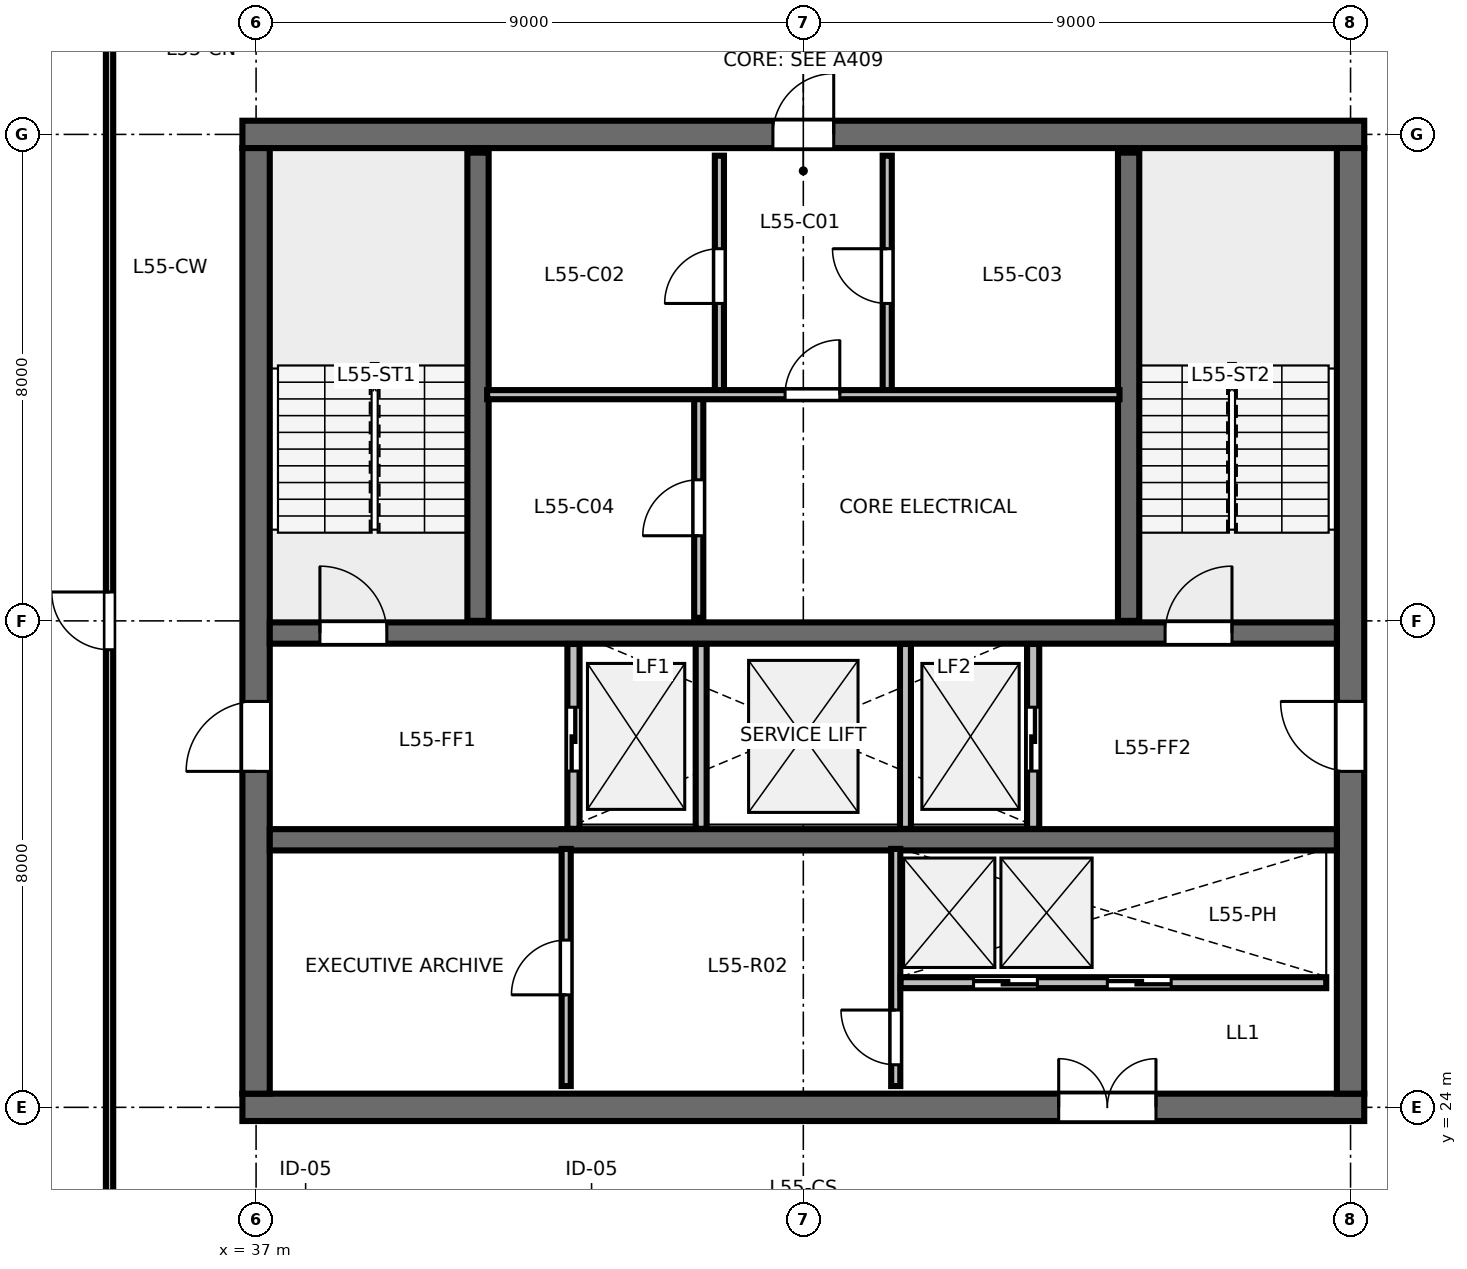
"""IFC4 building model, lengths in metres.
Left out: names, types, materials, properties, quantities, classifications, styles, units other than length and angle.
Written with IfcOpenShell. Run it as: python <this file> out.ifc"""

import sys

from ifc_helpers import new_model, si_unit, direction, frame, frame_2d, origin, place, context, subcontext, project, spatial, rectangle, extrude, element, fill, save


model = new_model("IFC4")
c1 = context("Model", 3, precision=1e-05, world=origin(), true_north=direction((0.0, 1.0)))
c2 = subcontext(c1, "Body", "Model", "MODEL_VIEW")
j1 = project(units=[si_unit("LENGTHUNIT", "METRE"), si_unit("PLANEANGLEUNIT", "RADIAN")], contexts=[c1])
p1 = place(None, origin())
s1 = spatial("IfcSite", under=j1, at=p1, CompositionType="ELEMENT")
p2 = place(p1, origin())
s2 = spatial("IfcBuilding", under=s1, at=p2, CompositionType="ELEMENT")
p3 = place(p2, frame((0.0, 0.0, 209.4)))
s3 = spatial("IfcBuildingStorey", under=s2, at=p3, CompositionType="ELEMENT", Elevation=209.4)
p4 = place(p3, frame((36.775, 24.0, 0.0), z_axis=(0.0, 0.0, 1.0), x_axis=(1.0, 0.0, 0.0)))
e1 = element("IfcWall", 1, at=p4, inside=s3, PredefinedType="SHEAR", context=c2, shape_type="SweptSolid", body=[
    extrude(rectangle(XDim=18.45, YDim=0.45, at=frame_2d((9.225, 0.0))), origin(), (0.0, 0.0, 1.0), 3.36),
])
p5 = place(p4, frame((13.425, 0.0, 0.0)))
e2 = element("IfcOpeningElement", 2, at=p5, cuts=e1, PredefinedType="OPENING", context=c2, shape_type="SweptSolid", body=[
    extrude(rectangle(XDim=1.6, YDim=2.15, at=frame_2d((0.8, 1.075))), frame((0.0, 0.235, 0.0), z_axis=(0.0, -1.0, 0.0), x_axis=(1.0, 0.0, 0.0)), (0.0, 0.0, 1.0), 0.47),
])
p6 = place(p3, frame((36.775, 40.0, 0.0), z_axis=(0.0, 0.0, 1.0), x_axis=(1.0, 0.0, 0.0)))
e3 = element("IfcWall", 3, at=p6, inside=s3, PredefinedType="SHEAR", context=c2, shape_type="SweptSolid", body=[
    extrude(rectangle(XDim=18.45, YDim=0.45, at=frame_2d((9.225, 0.0))), origin(), (0.0, 0.0, 1.0), 3.36),
])
p7 = place(p6, frame((8.725, 0.0, 0.0)))
e4 = element("IfcOpeningElement", 4, at=p7, cuts=e3, PredefinedType="OPENING", context=c2, shape_type="SweptSolid", body=[
    extrude(rectangle(XDim=1.0, YDim=2.15, at=frame_2d((0.5, 1.075))), frame((0.0, 0.235, 0.0), z_axis=(0.0, -1.0, 0.0), x_axis=(1.0, 0.0, 0.0)), (0.0, 0.0, 1.0), 0.47),
])
p8 = place(p3, frame((37.0, 24.225, 0.0), z_axis=(0.0, 0.0, 1.0), x_axis=(0.0, 1.0, 0.0)))
e5 = element("IfcWall", 5, at=p8, inside=s3, PredefinedType="SHEAR", context=c2, shape_type="SweptSolid", body=[
    extrude(rectangle(XDim=15.55, YDim=0.45, at=frame_2d((7.775, 0.0))), origin(), (0.0, 0.0, 1.0), 3.36),
])
p9 = place(p8, frame((5.3, 0.0, 0.0)))
e6 = element("IfcOpeningElement", 6, at=p9, cuts=e5, PredefinedType="OPENING", context=c2, shape_type="SweptSolid", body=[
    extrude(rectangle(XDim=1.15, YDim=2.15, at=frame_2d((0.575, 1.075))), frame((0.0, 0.235, 0.0), z_axis=(0.0, -1.0, 0.0), x_axis=(1.0, 0.0, 0.0)), (0.0, 0.0, 1.0), 0.47),
])
p10 = place(p3, frame((55.0, 24.225, 0.0), z_axis=(0.0, 0.0, 1.0), x_axis=(0.0, 1.0, 0.0)))
e7 = element("IfcWall", 7, at=p10, inside=s3, PredefinedType="SHEAR", context=c2, shape_type="SweptSolid", body=[
    extrude(rectangle(XDim=15.55, YDim=0.45, at=frame_2d((7.775, 0.0))), origin(), (0.0, 0.0, 1.0), 3.36),
])
p11 = place(p10, frame((5.3, 0.0, 0.0)))
e8 = element("IfcOpeningElement", 8, at=p11, cuts=e7, PredefinedType="OPENING", context=c2, shape_type="SweptSolid", body=[
    extrude(rectangle(XDim=1.15, YDim=2.15, at=frame_2d((0.575, 1.075))), frame((0.0, 0.235, 0.0), z_axis=(0.0, -1.0, 0.0), x_axis=(1.0, 0.0, 0.0)), (0.0, 0.0, 1.0), 0.47),
])
p12 = place(p3, frame((37.225, 31.8, 0.0), z_axis=(0.0, 0.0, 1.0), x_axis=(1.0, 0.0, 0.0)))
e9 = element("IfcWall", 9, at=p12, inside=s3, PredefinedType="SHEAR", context=c2, shape_type="SweptSolid", body=[
    extrude(rectangle(XDim=17.55, YDim=0.35, at=frame_2d((8.775, 0.0))), origin(), (0.0, 0.0, 1.0), 3.36),
])
p13 = place(p12, frame((0.825, 0.0, 0.0)))
e10 = element("IfcOpeningElement", 10, at=p13, cuts=e9, PredefinedType="OPENING", context=c2, shape_type="SweptSolid", body=[
    extrude(rectangle(XDim=1.1, YDim=2.15, at=frame_2d((0.55, 1.075))), frame((0.0, 0.185, 0.0), z_axis=(0.0, -1.0, 0.0), x_axis=(1.0, 0.0, 0.0)), (0.0, 0.0, 1.0), 0.37),
])
p14 = place(p12, frame((14.725, 0.0, 0.0)))
e11 = element("IfcOpeningElement", 11, at=p14, cuts=e9, PredefinedType="OPENING", context=c2, shape_type="SweptSolid", body=[
    extrude(rectangle(XDim=1.1, YDim=2.15, at=frame_2d((0.55, 1.075))), frame((0.0, 0.185, 0.0), z_axis=(0.0, -1.0, 0.0), x_axis=(1.0, 0.0, 0.0)), (0.0, 0.0, 1.0), 0.37),
])
p15 = place(p3, frame((37.225, 28.4, 0.0), z_axis=(0.0, 0.0, 1.0), x_axis=(1.0, 0.0, 0.0)))
e12 = element("IfcWall", 12, at=p15, inside=s3, PredefinedType="SHEAR", context=c2, shape_type="SweptSolid", body=[
    extrude(rectangle(XDim=17.55, YDim=0.35, at=frame_2d((8.775, 0.0))), origin(), (0.0, 0.0, 1.0), 3.36),
])
for number, where, z_axis, x_axis in (
    (13, (40.65, 32.0, 0.0), (0.0, 0.0, 1.0), (0.0, 1.0, 0.0)),
    (14, (51.35, 32.0, 0.0), (0.0, 0.0, 1.0), (0.0, 1.0, 0.0)),
):
    element("IfcWall", number, at=place(p3, frame(where, z_axis=z_axis, x_axis=x_axis)), inside=s3, PredefinedType="SHEAR", context=c2, shape_type="SweptSolid", body=[
        extrude(rectangle(XDim=7.7, YDim=0.35, at=frame_2d((3.85, 0.0))), origin(), (0.0, 0.0, 1.0), 3.6),
    ])
p16 = place(p3, frame((44.62, 35.72, 0.0), z_axis=(0.0, 0.0, 1.0), x_axis=(0.0, 1.0, 0.0)))
e15 = element("IfcWall", 15, at=p16, inside=s3, PredefinedType="PARTITIONING", context=c2, shape_type="SweptSolid", body=[
    extrude(rectangle(XDim=3.93, YDim=0.15, at=frame_2d((1.965, 0.0))), origin(), (0.0, 0.0, 1.0), 3.375),
])
p17 = place(p16, frame((1.5, 0.0, 0.0)))
e16 = element("IfcOpeningElement", 16, at=p17, cuts=e15, PredefinedType="OPENING", context=c2, shape_type="SweptSolid", body=[
    extrude(rectangle(XDim=0.9, YDim=2.15, at=frame_2d((0.45, 1.075))), frame((0.0, 0.085, 0.0), z_axis=(0.0, -1.0, 0.0), x_axis=(1.0, 0.0, 0.0)), (0.0, 0.0, 1.0), 0.17),
])
p18 = place(p3, frame((47.38, 35.72, 0.0), z_axis=(0.0, 0.0, 1.0), x_axis=(0.0, 1.0, 0.0)))
e17 = element("IfcWall", 17, at=p18, inside=s3, PredefinedType="PARTITIONING", context=c2, shape_type="SweptSolid", body=[
    extrude(rectangle(XDim=3.93, YDim=0.15, at=frame_2d((1.965, 0.0))), origin(), (0.0, 0.0, 1.0), 3.375),
])
p19 = place(p18, frame((1.5, 0.0, 0.0)))
e18 = element("IfcOpeningElement", 18, at=p19, cuts=e17, PredefinedType="OPENING", context=c2, shape_type="SweptSolid", body=[
    extrude(rectangle(XDim=0.9, YDim=2.15, at=frame_2d((0.45, 1.075))), frame((0.0, 0.085, 0.0), z_axis=(0.0, -1.0, 0.0), x_axis=(1.0, 0.0, 0.0)), (0.0, 0.0, 1.0), 0.17),
])
p20 = place(p3, frame((44.28, 32.05, 0.0), z_axis=(0.0, 0.0, 1.0), x_axis=(0.0, 1.0, 0.0)))
e19 = element("IfcWall", 19, at=p20, inside=s3, PredefinedType="PARTITIONING", context=c2, shape_type="SweptSolid", body=[
    extrude(rectangle(XDim=3.67, YDim=0.15, at=frame_2d((1.835, 0.0))), origin(), (0.0, 0.0, 1.0), 3.375),
])
p21 = place(p20, frame((1.35, 0.0, 0.0)))
e20 = element("IfcOpeningElement", 20, at=p21, cuts=e19, PredefinedType="OPENING", context=c2, shape_type="SweptSolid", body=[
    extrude(rectangle(XDim=0.92, YDim=2.15, at=frame_2d((0.46, 1.075))), frame((0.0, 0.085, 0.0), z_axis=(0.0, -1.0, 0.0), x_axis=(1.0, 0.0, 0.0)), (0.0, 0.0, 1.0), 0.17),
])
p22 = place(p3, frame((40.8, 35.72, 0.0), z_axis=(0.0, 0.0, 1.0), x_axis=(1.0, 0.0, 0.0)))
e21 = element("IfcWall", 21, at=p22, inside=s3, PredefinedType="PARTITIONING", context=c2, shape_type="SweptSolid", body=[
    extrude(rectangle(XDim=10.4, YDim=0.15, at=frame_2d((5.2, 0.0))), origin(), (0.0, 0.0, 1.0), 3.375),
])
p23 = place(p22, frame((4.9, 0.0, 0.0)))
e22 = element("IfcOpeningElement", 22, at=p23, cuts=e21, PredefinedType="OPENING", context=c2, shape_type="SweptSolid", body=[
    extrude(rectangle(XDim=0.9, YDim=2.15, at=frame_2d((0.45, 1.075))), frame((0.0, 0.085, 0.0), z_axis=(0.0, -1.0, 0.0), x_axis=(1.0, 0.0, 0.0)), (0.0, 0.0, 1.0), 0.17),
])
p24 = place(p3, frame((42.22, 28.58, 0.0), z_axis=(0.0, 0.0, 1.0), x_axis=(0.0, 1.0, 0.0)))
e23 = element("IfcWall", 23, at=p24, inside=s3, PredefinedType="PARTITIONING", context=c2, shape_type="SweptSolid", body=[
    extrude(rectangle(XDim=3.04, YDim=0.2, at=frame_2d((1.52, 0.0))), origin(), (0.0, 0.0, 1.0), 3.375),
])
p25 = place(p24, frame((0.95, 0.0, 0.0)))
e24 = element("IfcOpeningElement", 24, at=p25, cuts=e23, PredefinedType="OPENING", context=c2, shape_type="SweptSolid", body=[
    extrude(rectangle(XDim=1.05, YDim=2.15, at=frame_2d((0.525, 1.075))), frame((0.0, 0.11, 0.0), z_axis=(0.0, -1.0, 0.0), x_axis=(1.0, 0.0, 0.0)), (0.0, 0.0, 1.0), 0.22),
])
p26 = place(p3, frame((49.78, 28.58, 0.0), z_axis=(0.0, 0.0, 1.0), x_axis=(0.0, 1.0, 0.0)))
e25 = element("IfcWall", 25, at=p26, inside=s3, PredefinedType="PARTITIONING", context=c2, shape_type="SweptSolid", body=[
    extrude(rectangle(XDim=3.04, YDim=0.2, at=frame_2d((1.52, 0.0))), origin(), (0.0, 0.0, 1.0), 3.375),
])
p27 = place(p26, frame((0.95, 0.0, 0.0)))
e26 = element("IfcOpeningElement", 26, at=p27, cuts=e25, PredefinedType="OPENING", context=c2, shape_type="SweptSolid", body=[
    extrude(rectangle(XDim=1.05, YDim=2.15, at=frame_2d((0.525, 1.075))), frame((0.0, 0.11, 0.0), z_axis=(0.0, -1.0, 0.0), x_axis=(1.0, 0.0, 0.0)), (0.0, 0.0, 1.0), 0.22),
])
for number, where, z_axis, x_axis in (
    (27, (44.32, 28.58, 0.0), (0.0, 0.0, 1.0), (0.0, 1.0, 0.0)),
    (28, (47.68, 28.58, 0.0), (0.0, 0.0, 1.0), (0.0, 1.0, 0.0)),
):
    element("IfcWall", number, at=place(p3, frame(where, z_axis=z_axis, x_axis=x_axis)), inside=s3, PredefinedType="PARTITIONING", context=c2, shape_type="SweptSolid", body=[
        extrude(rectangle(XDim=3.04, YDim=0.18, at=frame_2d((1.52, 0.0))), origin(), (0.0, 0.0, 1.0), 3.375),
    ])
p28 = place(p3, frame((42.1, 24.35, 0.0), z_axis=(0.0, 0.0, 1.0), x_axis=(0.0, 1.0, 0.0)))
e29 = element("IfcWall", 29, at=p28, inside=s3, PredefinedType="PARTITIONING", context=c2, shape_type="SweptSolid", body=[
    extrude(rectangle(XDim=3.9, YDim=0.15, at=frame_2d((1.95, 0.0))), origin(), (0.0, 0.0, 1.0), 3.375),
])
p29 = place(p28, frame((1.5, 0.0, 0.0)))
e30 = element("IfcOpeningElement", 30, at=p29, cuts=e29, PredefinedType="OPENING", context=c2, shape_type="SweptSolid", body=[
    extrude(rectangle(XDim=0.9, YDim=2.15, at=frame_2d((0.45, 1.075))), frame((0.0, 0.085, 0.0), z_axis=(0.0, -1.0, 0.0), x_axis=(1.0, 0.0, 0.0)), (0.0, 0.0, 1.0), 0.17),
])
p30 = place(p3, frame((47.52, 24.35, 0.0), z_axis=(0.0, 0.0, 1.0), x_axis=(0.0, 1.0, 0.0)))
e31 = element("IfcWall", 31, at=p30, inside=s3, PredefinedType="PARTITIONING", context=c2, shape_type="SweptSolid", body=[
    extrude(rectangle(XDim=3.9, YDim=0.15, at=frame_2d((1.95, 0.0))), origin(), (0.0, 0.0, 1.0), 3.375),
])
p31 = place(p30, frame((0.35, 0.0, 0.0)))
e32 = element("IfcOpeningElement", 32, at=p31, cuts=e31, PredefinedType="OPENING", context=c2, shape_type="SweptSolid", body=[
    extrude(rectangle(XDim=0.9, YDim=2.15, at=frame_2d((0.45, 1.075))), frame((0.0, 0.085, 0.0), z_axis=(0.0, -1.0, 0.0), x_axis=(1.0, 0.0, 0.0)), (0.0, 0.0, 1.0), 0.17),
])
p32 = place(p3, frame((47.6, 26.05, 0.0), z_axis=(0.0, 0.0, 1.0), x_axis=(1.0, 0.0, 0.0)))
e33 = element("IfcWall", 33, at=p32, inside=s3, PredefinedType="PARTITIONING", context=c2, shape_type="SweptSolid", body=[
    extrude(rectangle(XDim=7.0, YDim=0.18, at=frame_2d((3.5, 0.0))), origin(), (0.0, 0.0, 1.0), 3.375),
])
p33 = place(p32, frame((1.2, 0.0, 0.0)))
e34 = element("IfcOpeningElement", 34, at=p33, cuts=e33, PredefinedType="OPENING", context=c2, shape_type="SweptSolid", body=[
    extrude(rectangle(XDim=1.05, YDim=2.15, at=frame_2d((0.525, 1.075))), frame((0.0, 0.1, 0.0), z_axis=(0.0, -1.0, 0.0), x_axis=(1.0, 0.0, 0.0)), (0.0, 0.0, 1.0), 0.2),
])
p34 = place(p32, frame((3.4, 0.0, 0.0)))
e35 = element("IfcOpeningElement", 35, at=p34, cuts=e33, PredefinedType="OPENING", context=c2, shape_type="SweptSolid", body=[
    extrude(rectangle(XDim=1.05, YDim=2.15, at=frame_2d((0.525, 1.075))), frame((0.0, 0.1, 0.0), z_axis=(0.0, -1.0, 0.0), x_axis=(1.0, 0.0, 0.0)), (0.0, 0.0, 1.0), 0.2),
])
p35 = place(p3, frame((34.59, 21.65, 0.0), z_axis=(0.0, 0.0, 1.0), x_axis=(0.0, 1.0, 0.0)))
e36 = element("IfcWall", 36, at=p35, inside=s3, PredefinedType="PARTITIONING", context=c2, shape_type="SweptSolid", body=[
    extrude(rectangle(XDim=20.7, YDim=0.12, at=frame_2d((10.35, 0.0))), origin(), (0.0, 0.0, 1.0), 2.655),
])
p36 = place(p35, frame((9.875, 0.0, 0.0)))
e37 = element("IfcOpeningElement", 37, at=p36, cuts=e36, PredefinedType="OPENING", context=c2, shape_type="SweptSolid", body=[
    extrude(rectangle(XDim=0.95, YDim=2.15, at=frame_2d((0.475, 1.075))), frame((0.0, 0.07, 0.0), z_axis=(0.0, -1.0, 0.0), x_axis=(1.0, 0.0, 0.0)), (0.0, 0.0, 1.0), 0.14),
])
p37 = place(p13, origin())
e38 = element("IfcDoor", 38, at=p37, inside=s3, OperationType="SINGLE_SWING_LEFT", PredefinedType="DOOR", context=c2, shape_type="SweptSolid", body=[
    extrude(rectangle(XDim=1.1, YDim=2.15, at=frame_2d((0.55, 1.075))), frame((0.0, 0.025, 0.0), z_axis=(0.0, -1.0, 0.0), x_axis=(1.0, 0.0, 0.0)), (0.0, 0.0, 1.0), 0.05),
])
fill(e10, e38)
p38 = place(p14, origin())
e39 = element("IfcDoor", 39, at=p38, inside=s3, OperationType="SINGLE_SWING_RIGHT", PredefinedType="DOOR", context=c2, shape_type="SweptSolid", body=[
    extrude(rectangle(XDim=1.1, YDim=2.15, at=frame_2d((0.55, 1.075))), frame((0.0, 0.025, 0.0), z_axis=(0.0, -1.0, 0.0), x_axis=(1.0, 0.0, 0.0)), (0.0, 0.0, 1.0), 0.05),
])
fill(e11, e39)
p39 = place(p7, origin())
e40 = element("IfcDoor", 40, at=p39, inside=s3, OperationType="SINGLE_SWING_RIGHT", PredefinedType="DOOR", context=c2, shape_type="SweptSolid", body=[
    extrude(rectangle(XDim=1.0, YDim=2.15, at=frame_2d((0.5, 1.075))), frame((0.0, 0.025, 0.0), z_axis=(0.0, -1.0, 0.0), x_axis=(1.0, 0.0, 0.0)), (0.0, 0.0, 1.0), 0.05),
])
fill(e4, e40)
p40 = place(p9, origin())
e41 = element("IfcDoor", 41, at=p40, inside=s3, OperationType="SINGLE_SWING_LEFT", PredefinedType="DOOR", context=c2, shape_type="SweptSolid", body=[
    extrude(rectangle(XDim=1.15, YDim=2.15, at=frame_2d((0.575, 1.075))), frame((0.0, 0.025, 0.0), z_axis=(0.0, -1.0, 0.0), x_axis=(1.0, 0.0, 0.0)), (0.0, 0.0, 1.0), 0.05),
])
fill(e6, e41)
p41 = place(p11, origin())
e42 = element("IfcDoor", 42, at=p41, inside=s3, OperationType="SINGLE_SWING_RIGHT", PredefinedType="DOOR", context=c2, shape_type="SweptSolid", body=[
    extrude(rectangle(XDim=1.15, YDim=2.15, at=frame_2d((0.575, 1.075))), frame((0.0, 0.025, 0.0), z_axis=(0.0, -1.0, 0.0), x_axis=(1.0, 0.0, 0.0)), (0.0, 0.0, 1.0), 0.05),
])
fill(e8, e42)
p42 = place(p5, origin())
e43 = element("IfcDoor", 43, at=p42, inside=s3, OperationType="DOUBLE_DOOR_SINGLE_SWING", PredefinedType="DOOR", context=c2, shape_type="SweptSolid", body=[
    extrude(rectangle(XDim=1.6, YDim=2.15, at=frame_2d((0.8, 1.075))), frame((0.0, 0.025, 0.0), z_axis=(0.0, -1.0, 0.0), x_axis=(1.0, 0.0, 0.0)), (0.0, 0.0, 1.0), 0.05),
])
fill(e2, e43)
p43 = place(p17, origin())
e44 = element("IfcDoor", 44, at=p43, inside=s3, OperationType="SINGLE_SWING_LEFT", PredefinedType="DOOR", context=c2, shape_type="SweptSolid", body=[
    extrude(rectangle(XDim=0.9, YDim=2.15, at=frame_2d((0.45, 1.075))), frame((0.0, 0.025, 0.0), z_axis=(0.0, -1.0, 0.0), x_axis=(1.0, 0.0, 0.0)), (0.0, 0.0, 1.0), 0.05),
])
fill(e16, e44)
p44 = place(p19, origin())
e45 = element("IfcDoor", 45, at=p44, inside=s3, OperationType="SINGLE_SWING_RIGHT", PredefinedType="DOOR", context=c2, shape_type="SweptSolid", body=[
    extrude(rectangle(XDim=0.9, YDim=2.15, at=frame_2d((0.45, 1.075))), frame((0.0, 0.025, 0.0), z_axis=(0.0, -1.0, 0.0), x_axis=(1.0, 0.0, 0.0)), (0.0, 0.0, 1.0), 0.05),
])
fill(e18, e45)
p45 = place(p21, origin())
e46 = element("IfcDoor", 46, at=p45, inside=s3, OperationType="SINGLE_SWING_LEFT", PredefinedType="DOOR", context=c2, shape_type="SweptSolid", body=[
    extrude(rectangle(XDim=0.92, YDim=2.15, at=frame_2d((0.46, 1.075))), frame((0.0, 0.025, 0.0), z_axis=(0.0, -1.0, 0.0), x_axis=(1.0, 0.0, 0.0)), (0.0, 0.0, 1.0), 0.05),
])
fill(e20, e46)
p46 = place(p23, origin())
e47 = element("IfcDoor", 47, at=p46, inside=s3, OperationType="SINGLE_SWING_RIGHT", PredefinedType="DOOR", context=c2, shape_type="SweptSolid", body=[
    extrude(rectangle(XDim=0.9, YDim=2.15, at=frame_2d((0.45, 1.075))), frame((0.0, 0.025, 0.0), z_axis=(0.0, -1.0, 0.0), x_axis=(1.0, 0.0, 0.0)), (0.0, 0.0, 1.0), 0.05),
])
fill(e22, e47)
p47 = place(p25, origin())
e48 = element("IfcDoor", 48, at=p47, inside=s3, OperationType="SLIDING_TO_LEFT", PredefinedType="DOOR", context=c2, shape_type="SweptSolid", body=[
    extrude(rectangle(XDim=1.05, YDim=2.15, at=frame_2d((0.525, 1.075))), frame((0.0, 0.025, 0.0), z_axis=(0.0, -1.0, 0.0), x_axis=(1.0, 0.0, 0.0)), (0.0, 0.0, 1.0), 0.05),
])
fill(e24, e48)
p48 = place(p27, origin())
e49 = element("IfcDoor", 49, at=p48, inside=s3, OperationType="SLIDING_TO_RIGHT", PredefinedType="DOOR", context=c2, shape_type="SweptSolid", body=[
    extrude(rectangle(XDim=1.05, YDim=2.15, at=frame_2d((0.525, 1.075))), frame((0.0, 0.025, 0.0), z_axis=(0.0, -1.0, 0.0), x_axis=(1.0, 0.0, 0.0)), (0.0, 0.0, 1.0), 0.05),
])
fill(e26, e49)
p49 = place(p29, origin())
e50 = element("IfcDoor", 50, at=p49, inside=s3, OperationType="SINGLE_SWING_LEFT", PredefinedType="DOOR", context=c2, shape_type="SweptSolid", body=[
    extrude(rectangle(XDim=0.9, YDim=2.15, at=frame_2d((0.45, 1.075))), frame((0.0, 0.025, 0.0), z_axis=(0.0, -1.0, 0.0), x_axis=(1.0, 0.0, 0.0)), (0.0, 0.0, 1.0), 0.05),
])
fill(e30, e50)
p50 = place(p31, origin())
e51 = element("IfcDoor", 51, at=p50, inside=s3, OperationType="SINGLE_SWING_RIGHT", PredefinedType="DOOR", context=c2, shape_type="SweptSolid", body=[
    extrude(rectangle(XDim=0.9, YDim=2.15, at=frame_2d((0.45, 1.075))), frame((0.0, 0.025, 0.0), z_axis=(0.0, -1.0, 0.0), x_axis=(1.0, 0.0, 0.0)), (0.0, 0.0, 1.0), 0.05),
])
fill(e32, e51)
p51 = place(p33, origin())
e52 = element("IfcDoor", 52, at=p51, inside=s3, OperationType="SLIDING_TO_LEFT", PredefinedType="DOOR", context=c2, shape_type="SweptSolid", body=[
    extrude(rectangle(XDim=1.05, YDim=2.15, at=frame_2d((0.525, 1.075))), frame((0.0, 0.025, 0.0), z_axis=(0.0, -1.0, 0.0), x_axis=(1.0, 0.0, 0.0)), (0.0, 0.0, 1.0), 0.05),
])
fill(e34, e52)
p52 = place(p34, origin())
e53 = element("IfcDoor", 53, at=p52, inside=s3, OperationType="SLIDING_TO_RIGHT", PredefinedType="DOOR", context=c2, shape_type="SweptSolid", body=[
    extrude(rectangle(XDim=1.05, YDim=2.15, at=frame_2d((0.525, 1.075))), frame((0.0, 0.025, 0.0), z_axis=(0.0, -1.0, 0.0), x_axis=(1.0, 0.0, 0.0)), (0.0, 0.0, 1.0), 0.05),
])
fill(e35, e53)
p53 = place(p36, origin())
e54 = element("IfcDoor", 54, at=p53, inside=s3, OperationType="SINGLE_SWING_RIGHT", PredefinedType="DOOR", context=c2, shape_type="SweptSolid", body=[
    extrude(rectangle(XDim=0.95, YDim=2.15, at=frame_2d((0.475, 1.075))), frame((0.0, 0.025, 0.0), z_axis=(0.0, -1.0, 0.0), x_axis=(1.0, 0.0, 0.0)), (0.0, 0.0, 1.0), 0.05),
])
fill(e37, e54)
save(model, sys.argv[1])
